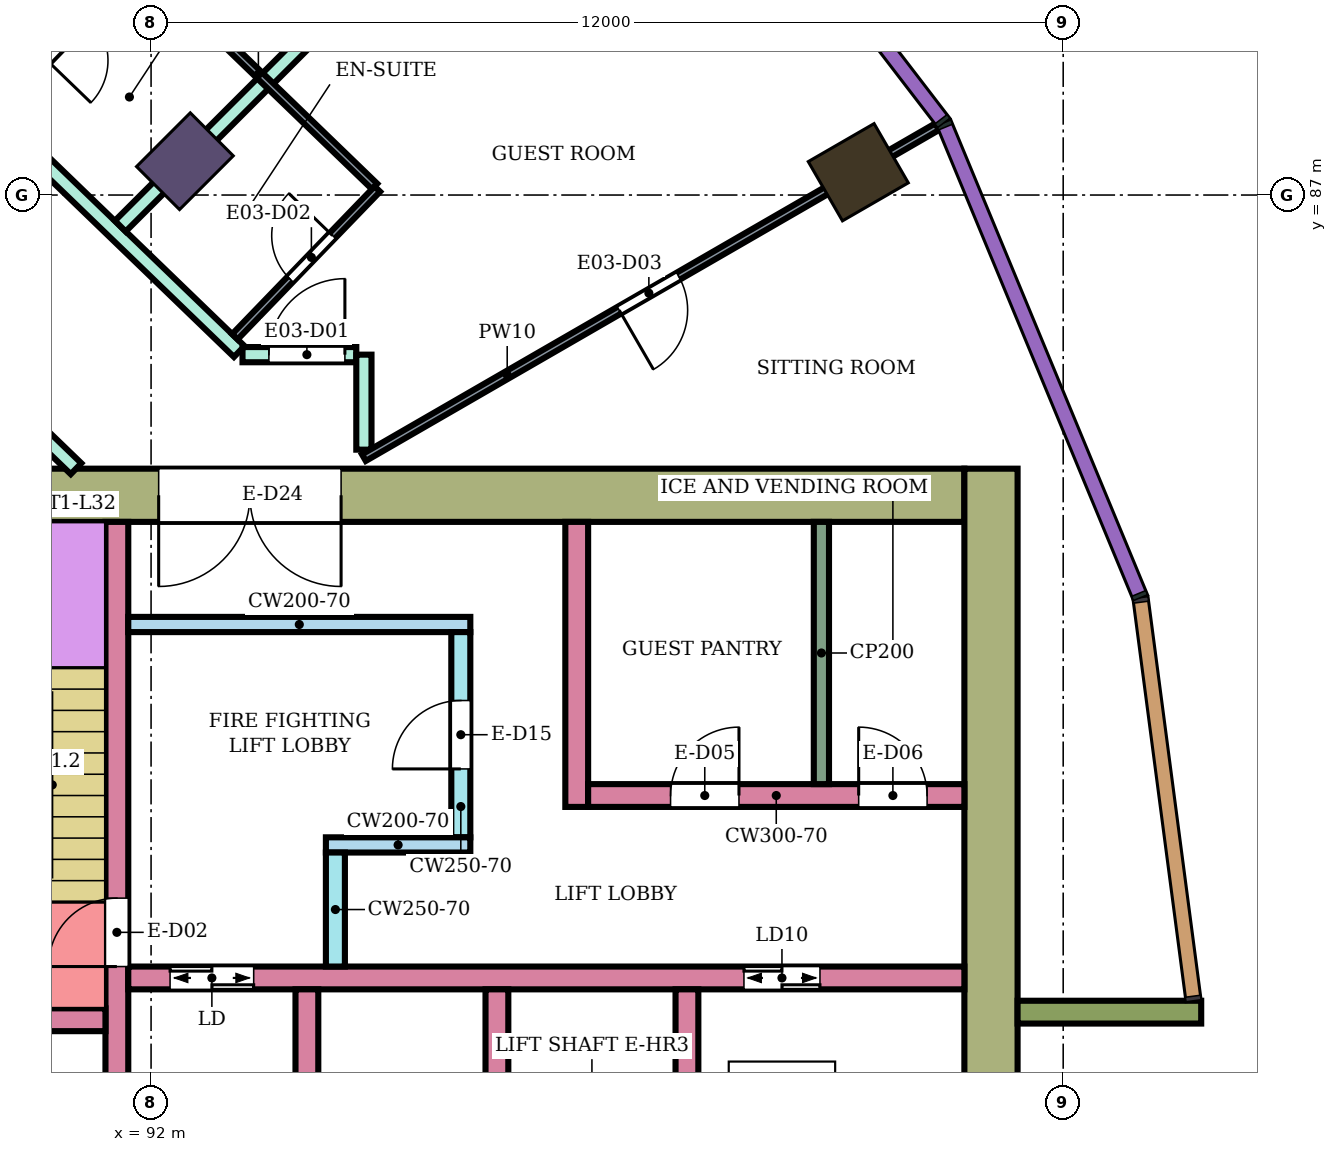
"""IFC4 building model, lengths in metres.
Left out: names, types, materials, properties, quantities, classifications, styles, units other than length and angle.
Written with IfcOpenShell. Run it as: python <this file> out.ifc"""

import sys

from ifc_helpers import new_model, si_unit, direction, frame, frame_2d, origin, origin_2d, place, context, subcontext, project, spatial, rectangle, extrude, element, fill, save


model = new_model("IFC4")
c1 = context("Model", 3, precision=1e-05, world=origin(), true_north=direction((0.0, 1.0)))
c2 = subcontext(c1, "Body", "Model", "MODEL_VIEW")
j1 = project(units=[si_unit("LENGTHUNIT", "METRE"), si_unit("PLANEANGLEUNIT", "RADIAN")], contexts=[c1])
p1 = place(None, origin())
s1 = spatial("IfcSite", under=j1, at=p1, CompositionType="ELEMENT")
p2 = place(p1, origin())
s2 = spatial("IfcBuilding", under=s1, at=p2, CompositionType="ELEMENT")
p3 = place(p2, frame((0.0, 0.0, 138.0)))
s3 = spatial("IfcBuildingStorey", under=s2, at=p3, CompositionType="ELEMENT", Elevation=138.0)
p4 = place(p3, frame((101.304, 87.3, 0.0), z_axis=(0.0, 0.0, 1.0), x_axis=(0.866025403784, 0.5, 0.0)))
e1 = element("IfcColumn", 1, at=p4, inside=s3, PredefinedType="COLUMN", context=c2, shape_type="SweptSolid", body=[
    extrude(rectangle(XDim=1.0, YDim=0.9, at=origin_2d()), origin(), (0.0, 0.0, 1.0), 3.9),
])
p5 = place(p3, frame((92.445, 87.445, 0.0), z_axis=(0.0, 0.0, 1.0), x_axis=(0.707106781187, 0.707106781187, 0.0)))
e2 = element("IfcColumn", 2, at=p5, inside=s3, PredefinedType="COLUMN", context=c2, shape_type="SweptSolid", body=[
    extrude(rectangle(XDim=1.0, YDim=0.8, at=origin_2d()), origin(), (0.0, 0.0, 1.0), 3.9),
])
p6 = place(p3, frame((87.9, 83.05, 0.0), z_axis=(0.0, 0.0, 1.0), x_axis=(1.0, 0.0, 0.0)))
e3 = element("IfcWall", 3, at=p6, inside=s3, PredefinedType="SHEAR", context=c2, shape_type="SweptSolid", body=[
    extrude(rectangle(XDim=14.8, YDim=0.7, at=frame_2d((7.4, 0.0))), origin(), (0.0, 0.0, 1.0), 3.58),
])
p7 = place(p6, frame((4.2, 0.0, 0.0)))
e4 = element("IfcOpeningElement", 4, at=p7, cuts=e3, PredefinedType="OPENING", context=c2, shape_type="SweptSolid", body=[
    extrude(rectangle(XDim=2.4, YDim=2.4, at=frame_2d((1.2, 1.2))), frame((0.0, 0.36, 0.0), z_axis=(0.0, -1.0, 0.0), x_axis=(1.0, 0.0, 0.0)), (0.0, 0.0, 1.0), 0.72),
])
p8 = place(p3, frame((103.05, 66.6, 0.0), z_axis=(0.0, 0.0, 1.0), x_axis=(0.0, 1.0, 0.0)))
e5 = element("IfcWall", 5, at=p8, inside=s3, PredefinedType="SHEAR", context=c2, shape_type="SweptSolid", body=[
    extrude(rectangle(XDim=16.8, YDim=0.7, at=frame_2d((8.4, 0.0))), origin(), (0.0, 0.0, 1.0), 3.58),
])
p9 = place(p3, frame((91.55, 75.0, 0.0), z_axis=(0.0, 0.0, 1.0), x_axis=(0.0, 1.0, 0.0)))
e6 = element("IfcWall", 6, at=p9, inside=s3, PredefinedType="SHEAR", context=c2, shape_type="SweptSolid", body=[
    extrude(rectangle(XDim=7.7, YDim=0.3, at=frame_2d((3.85, 0.0))), origin(), (0.0, 0.0, 1.0), 3.58),
])
p10 = place(p9, frame((1.85, 0.0, 0.0)))
e7 = element("IfcOpeningElement", 7, at=p10, cuts=e6, PredefinedType="OPENING", context=c2, shape_type="SweptSolid", body=[
    extrude(rectangle(XDim=0.9, YDim=2.1, at=frame_2d((0.45, 1.05))), frame((0.0, 0.16, 0.0), z_axis=(0.0, -1.0, 0.0), x_axis=(1.0, 0.0, 0.0)), (0.0, 0.0, 1.0), 0.32),
])
p11 = place(p3, frame((88.35, 76.15, 0.0), z_axis=(0.0, 0.0, 1.0), x_axis=(1.0, 0.0, 0.0)))
e8 = element("IfcWall", 8, at=p11, inside=s3, PredefinedType="SHEAR", context=c2, shape_type="SweptSolid", body=[
    extrude(rectangle(XDim=3.05, YDim=0.3, at=frame_2d((1.525, 0.0))), origin(), (0.0, 0.0, 1.0), 3.58),
])
p12 = place(p11, frame((1.1, 0.0, 0.0)))
e9 = element("IfcOpeningElement", 9, at=p12, cuts=e8, PredefinedType="OPENING", context=c2, shape_type="SweptSolid", body=[
    extrude(rectangle(XDim=0.7, YDim=2.0, at=frame_2d((0.35, 1.0))), frame((0.0, 0.16, 0.0), z_axis=(0.0, -1.0, 0.0), x_axis=(1.0, 0.0, 0.0)), (0.0, 0.0, 1.0), 0.32),
])
p13 = place(p3, frame((91.7, 76.7, 0.0), z_axis=(0.0, 0.0, 1.0), x_axis=(1.0, 0.0, 0.0)))
e10 = element("IfcWall", 10, at=p13, inside=s3, PredefinedType="SHEAR", context=c2, shape_type="SweptSolid", body=[
    extrude(rectangle(XDim=11.0, YDim=0.3, at=frame_2d((5.5, 0.0))), origin(), (0.0, 0.0, 1.0), 3.58),
])
p14 = place(p13, frame((0.55, 0.0, 0.0)))
e11 = element("IfcOpeningElement", 11, at=p14, cuts=e10, PredefinedType="OPENING", context=c2, shape_type="SweptSolid", body=[
    extrude(rectangle(XDim=1.1, YDim=2.1, at=frame_2d((0.55, 1.05))), frame((0.0, 0.16, 0.0), z_axis=(0.0, -1.0, 0.0), x_axis=(1.0, 0.0, 0.0)), (0.0, 0.0, 1.0), 0.32),
])
p15 = place(p13, frame((8.1, 0.0, 0.0)))
e12 = element("IfcOpeningElement", 12, at=p15, cuts=e10, PredefinedType="OPENING", context=c2, shape_type="SweptSolid", body=[
    extrude(rectangle(XDim=1.0, YDim=2.1, at=frame_2d((0.5, 1.05))), frame((0.0, 0.16, 0.0), z_axis=(0.0, -1.0, 0.0), x_axis=(1.0, 0.0, 0.0)), (0.0, 0.0, 1.0), 0.32),
])
for number, where, z_axis, x_axis in (
    (13, (94.05, 74.0, 0.0), (0.0, 0.0, 1.0), (0.0, 1.0, 0.0)),
    (14, (96.55, 74.0, 0.0), (0.0, 0.0, 1.0), (0.0, 1.0, 0.0)),
    (15, (99.05, 74.0, 0.0), (0.0, 0.0, 1.0), (0.0, 1.0, 0.0)),
):
    element("IfcWall", number, at=place(p3, frame(where, z_axis=z_axis, x_axis=x_axis)), inside=s3, PredefinedType="SHEAR", context=c2, shape_type="SweptSolid", body=[
        extrude(rectangle(XDim=2.55, YDim=0.3, at=frame_2d((1.275, 0.0))), origin(), (0.0, 0.0, 1.0), 3.58),
    ])
p16 = place(p3, frame((91.7, 81.35, 0.0), z_axis=(0.0, 0.0, 1.0), x_axis=(1.0, 0.0, 0.0)))
e16 = element("IfcWall", 16, at=p16, inside=s3, PredefinedType="SHEAR", context=c2, shape_type="SweptSolid", body=[
    extrude(rectangle(XDim=4.5, YDim=0.2, at=frame_2d((2.25, 0.0))), origin(), (0.0, 0.0, 1.0), 3.58),
])
p17 = place(p3, frame((96.075, 78.55, 0.0), z_axis=(0.0, 0.0, 1.0), x_axis=(0.0, 1.0, 0.0)))
e17 = element("IfcWall", 17, at=p17, inside=s3, PredefinedType="SHEAR", context=c2, shape_type="SweptSolid", body=[
    extrude(rectangle(XDim=2.7, YDim=0.25, at=frame_2d((1.35, 0.0))), origin(), (0.0, 0.0, 1.0), 3.58),
])
p18 = place(p17, frame((0.9, 0.0, 0.0)))
e18 = element("IfcOpeningElement", 18, at=p18, cuts=e17, PredefinedType="OPENING", context=c2, shape_type="SweptSolid", body=[
    extrude(rectangle(XDim=0.9, YDim=2.1, at=frame_2d((0.45, 1.05))), frame((0.0, 0.135, 0.0), z_axis=(0.0, -1.0, 0.0), x_axis=(1.0, 0.0, 0.0)), (0.0, 0.0, 1.0), 0.27),
])
p19 = place(p3, frame((94.3, 78.45, 0.0), z_axis=(0.0, 0.0, 1.0), x_axis=(1.0, 0.0, 0.0)))
e19 = element("IfcWall", 19, at=p19, inside=s3, PredefinedType="SHEAR", context=c2, shape_type="SweptSolid", body=[
    extrude(rectangle(XDim=1.9, YDim=0.2, at=frame_2d((0.95, 0.0))), origin(), (0.0, 0.0, 1.0), 3.58),
])
p20 = place(p3, frame((94.425, 76.85, 0.0), z_axis=(0.0, 0.0, 1.0), x_axis=(0.0, 1.0, 0.0)))
e20 = element("IfcWall", 20, at=p20, inside=s3, PredefinedType="SHEAR", context=c2, shape_type="SweptSolid", body=[
    extrude(rectangle(XDim=1.5, YDim=0.25, at=frame_2d((0.75, 0.0))), origin(), (0.0, 0.0, 1.0), 3.58),
])
p21 = place(p3, frame((97.6, 78.95, 0.0), z_axis=(0.0, 0.0, 1.0), x_axis=(0.0, 1.0, 0.0)))
e21 = element("IfcWall", 21, at=p21, inside=s3, PredefinedType="SHEAR", context=c2, shape_type="SweptSolid", body=[
    extrude(rectangle(XDim=3.75, YDim=0.3, at=frame_2d((1.875, 0.0))), origin(), (0.0, 0.0, 1.0), 3.58),
])
p22 = place(p3, frame((97.75, 79.1, 0.0), z_axis=(0.0, 0.0, 1.0), x_axis=(1.0, 0.0, 0.0)))
e22 = element("IfcWall", 22, at=p22, inside=s3, PredefinedType="SHEAR", context=c2, shape_type="SweptSolid", body=[
    extrude(rectangle(XDim=4.95, YDim=0.3, at=frame_2d((2.475, 0.0))), origin(), (0.0, 0.0, 1.0), 3.58),
])
p23 = place(p22, frame((1.084, 0.0, 0.0)))
e23 = element("IfcOpeningElement", 23, at=p23, cuts=e22, PredefinedType="OPENING", context=c2, shape_type="SweptSolid", body=[
    extrude(rectangle(XDim=0.9, YDim=2.1, at=frame_2d((0.45, 1.05))), frame((0.0, 0.16, 0.0), z_axis=(0.0, -1.0, 0.0), x_axis=(1.0, 0.0, 0.0)), (0.0, 0.0, 1.0), 0.32),
])
p24 = place(p22, frame((3.56, 0.0, 0.0)))
e24 = element("IfcOpeningElement", 24, at=p24, cuts=e22, PredefinedType="OPENING", context=c2, shape_type="SweptSolid", body=[
    extrude(rectangle(XDim=0.9, YDim=2.1, at=frame_2d((0.45, 1.05))), frame((0.0, 0.16, 0.0), z_axis=(0.0, -1.0, 0.0), x_axis=(1.0, 0.0, 0.0)), (0.0, 0.0, 1.0), 0.32),
])
p25 = place(p3, frame((103.4, 76.25, 0.0), z_axis=(0.0, 0.0, 1.0), x_axis=(1.0, 0.0, 0.0)))
e25 = element("IfcWall", 25, at=p25, inside=s3, PredefinedType="NOTDEFINED", context=c2, shape_type="SweptSolid", body=[
    extrude(rectangle(XDim=2.416, YDim=0.3, at=frame_2d((1.208, 0.0))), origin(), (0.0, 0.0, 1.0), 3.9),
])
p26 = place(p3, frame((87.064, 87.211, 0.0), z_axis=(0.0, 0.0, 1.0), x_axis=(0.719562412484, -0.694427774891, 0.0)))
e26 = element("IfcWall", 26, at=p26, inside=s3, PredefinedType="PARTITIONING", context=c2, shape_type="SweptSolid", body=[
    extrude(rectangle(XDim=5.488, YDim=0.2, at=frame_2d((2.744, 0.0))), origin(), (0.0, 0.0, 1.0), 3.45),
])
p27 = place(p26, frame((2.294, 0.0, 0.0)))
e27 = element("IfcOpeningElement", 27, at=p27, cuts=e26, PredefinedType="OPENING", context=c2, shape_type="SweptSolid", body=[
    extrude(rectangle(XDim=0.9, YDim=2.1, at=frame_2d((0.45, 1.05))), frame((0.0, 0.11, 0.0), z_axis=(0.0, -1.0, 0.0), x_axis=(1.0, 0.0, 0.0)), (0.0, 0.0, 1.0), 0.22),
])
p28 = place(p3, frame((88.386, 89.549, 0.0), z_axis=(0.0, 0.0, 1.0), x_axis=(0.719507339337, -0.694484836869, 0.0)))
e28 = element("IfcWall", 28, at=p28, inside=s3, PredefinedType="PARTITIONING", context=c2, shape_type="SweptSolid", body=[
    extrude(rectangle(XDim=6.635, YDim=0.2, at=frame_2d((3.317, 0.0))), origin(), (0.0, 0.0, 1.0), 3.45),
])
p29 = place(p3, frame((91.595, 86.591, 0.0), z_axis=(0.0, 0.0, 1.0), x_axis=(0.707214399597, 0.706999146394, 0.0)))
e29 = element("IfcWall", 29, at=p29, inside=s3, PredefinedType="PARTITIONING", context=c2, shape_type="SweptSolid", body=[
    extrude(rectangle(XDim=6.805, YDim=0.2, at=frame_2d((3.403, 0.0))), origin(), (0.0, 0.0, 1.0), 3.45),
])
p30 = place(p3, frame((93.203, 84.9, 0.0), z_axis=(0.0, 0.0, 1.0), x_axis=(1.0, 0.0, 0.0)))
e30 = element("IfcWall", 30, at=p30, inside=s3, PredefinedType="PARTITIONING", context=c2, shape_type="SweptSolid", body=[
    extrude(rectangle(XDim=1.497, YDim=0.2, at=frame_2d((0.749, 0.0))), origin(), (0.0, 0.0, 1.0), 3.45),
])
p31 = place(p30, frame((0.347, 0.0, 0.0)))
e31 = element("IfcOpeningElement", 31, at=p31, cuts=e30, PredefinedType="OPENING", context=c2, shape_type="SweptSolid", body=[
    extrude(rectangle(XDim=1.0, YDim=2.1, at=frame_2d((0.5, 1.05))), frame((0.0, 0.11, 0.0), z_axis=(0.0, -1.0, 0.0), x_axis=(1.0, 0.0, 0.0)), (0.0, 0.0, 1.0), 0.22),
])
p32 = place(p3, frame((94.8, 83.65, 0.0), z_axis=(0.0, 0.0, 1.0), x_axis=(0.0, 1.0, 0.0)))
e32 = element("IfcWall", 32, at=p32, inside=s3, PredefinedType="PARTITIONING", context=c2, shape_type="SweptSolid", body=[
    extrude(rectangle(XDim=1.25, YDim=0.2, at=frame_2d((0.625, 0.0))), origin(), (0.0, 0.0, 1.0), 3.45),
])
p33 = place(p3, frame((90.008, 88.123, 0.0), z_axis=(0.0, 0.0, 1.0), x_axis=(0.694372521817, 0.719615731447, 0.0)))
e33 = element("IfcWall", 33, at=p33, inside=s3, PredefinedType="PARTITIONING", context=c2, shape_type="SweptSolid", body=[
    extrude(rectangle(XDim=2.65, YDim=0.1, at=frame_2d((1.325, 0.0))), origin(), (0.0, 0.0, 1.0), 3.45),
])
p34 = place(p33, frame((0.9, 0.0, 0.0)))
e34 = element("IfcOpeningElement", 34, at=p34, cuts=e33, PredefinedType="OPENING", context=c2, shape_type="SweptSolid", body=[
    extrude(rectangle(XDim=0.8, YDim=2.1, at=frame_2d((0.4, 1.05))), frame((0.0, 0.06, 0.0), z_axis=(0.0, -1.0, 0.0), x_axis=(1.0, 0.0, 0.0)), (0.0, 0.0, 1.0), 0.12),
])
p35 = place(p3, frame((91.883, 90.066, 0.0), z_axis=(0.0, 0.0, 1.0), x_axis=(0.719460839421, -0.694533008963, 0.0)))
e35 = element("IfcWall", 35, at=p35, inside=s3, PredefinedType="PARTITIONING", context=c2, shape_type="SweptSolid", body=[
    extrude(rectangle(XDim=4.25, YDim=0.1, at=frame_2d((2.125, 0.0))), origin(), (0.0, 0.0, 1.0), 3.45),
])
p36 = place(p3, frame((93.103, 85.136, 0.0), z_axis=(0.0, 0.0, 1.0), x_axis=(0.694287838235, 0.719697434815, 0.0)))
e36 = element("IfcWall", 36, at=p36, inside=s3, PredefinedType="PARTITIONING", context=c2, shape_type="SweptSolid", body=[
    extrude(rectangle(XDim=2.7, YDim=0.1, at=frame_2d((1.35, 0.0))), origin(), (0.0, 0.0, 1.0), 3.45),
])
p37 = place(p36, frame((1.05, 0.0, 0.0)))
e37 = element("IfcOpeningElement", 37, at=p37, cuts=e36, PredefinedType="OPENING", context=c2, shape_type="SweptSolid", body=[
    extrude(rectangle(XDim=0.8, YDim=2.1, at=frame_2d((0.4, 1.05))), frame((0.0, 0.06, 0.0), z_axis=(0.0, -1.0, 0.0), x_axis=(1.0, 0.0, 0.0)), (0.0, 0.0, 1.0), 0.12),
])
p38 = place(p3, frame((94.8, 83.545, 0.0), z_axis=(0.0, 0.0, 1.0), x_axis=(0.86602264145, 0.500004784474, 0.0)))
e38 = element("IfcWall", 38, at=p38, inside=s3, PredefinedType="PARTITIONING", context=c2, shape_type="SweptSolid", body=[
    extrude(rectangle(XDim=8.708, YDim=0.1, at=frame_2d((4.354, 0.0))), origin(), (0.0, 0.0, 1.0), 3.45),
])
p39 = place(p38, frame((3.879, 0.0, 0.0)))
e39 = element("IfcOpeningElement", 39, at=p39, cuts=e38, PredefinedType="OPENING", context=c2, shape_type="SweptSolid", body=[
    extrude(rectangle(XDim=0.9, YDim=2.1, at=frame_2d((0.45, 1.05))), frame((0.0, 0.06, 0.0), z_axis=(0.0, -1.0, 0.0), x_axis=(1.0, 0.0, 0.0)), (0.0, 0.0, 1.0), 0.12),
])
p40 = place(p3, frame((100.819, 79.25, 0.0), z_axis=(0.0, 0.0, 1.0), x_axis=(0.0, 1.0, 0.0)))
e40 = element("IfcWall", 40, at=p40, inside=s3, PredefinedType="PARTITIONING", context=c2, shape_type="SweptSolid", body=[
    extrude(rectangle(XDim=3.45, YDim=0.2, at=frame_2d((1.725, 0.0))), origin(), (0.0, 0.0, 1.0), 3.58),
])
p41 = place(p31, origin())
e41 = element("IfcDoor", 41, at=p41, inside=s3, OperationType="SINGLE_SWING_RIGHT", PredefinedType="DOOR", context=c2, shape_type="SweptSolid", body=[
    extrude(rectangle(XDim=1.0, YDim=2.1, at=frame_2d((0.5, 1.05))), frame((0.0, 0.025, 0.0), z_axis=(0.0, -1.0, 0.0), x_axis=(1.0, 0.0, 0.0)), (0.0, 0.0, 1.0), 0.05),
])
fill(e31, e41)
p42 = place(p37, origin())
e42 = element("IfcDoor", 42, at=p42, inside=s3, OperationType="SINGLE_SWING_RIGHT", PredefinedType="DOOR", context=c2, shape_type="SweptSolid", body=[
    extrude(rectangle(XDim=0.8, YDim=2.1, at=frame_2d((0.4, 1.05))), frame((0.0, 0.025, 0.0), z_axis=(0.0, -1.0, 0.0), x_axis=(1.0, 0.0, 0.0)), (0.0, 0.0, 1.0), 0.05),
])
fill(e37, e42)
p43 = place(p39, frame((0.9, 0.0, 0.0), z_axis=(0.0, 0.0, 1.0), x_axis=(-1.0, 0.0, 0.0)))
e43 = element("IfcDoor", 43, at=p43, inside=s3, OperationType="SINGLE_SWING_RIGHT", PredefinedType="DOOR", context=c2, shape_type="SweptSolid", body=[
    extrude(rectangle(XDim=0.9, YDim=2.1, at=frame_2d((0.45, 1.05))), frame((0.0, 0.025, 0.0), z_axis=(0.0, -1.0, 0.0), x_axis=(1.0, 0.0, 0.0)), (0.0, 0.0, 1.0), 0.05),
])
fill(e39, e43)
p44 = place(p34, frame((0.8, 0.0, 0.0), z_axis=(0.0, 0.0, 1.0), x_axis=(-1.0, 0.0, 0.0)))
e44 = element("IfcDoor", 44, at=p44, inside=s3, OperationType="SINGLE_SWING_RIGHT", PredefinedType="DOOR", context=c2, shape_type="SweptSolid", body=[
    extrude(rectangle(XDim=0.8, YDim=2.1, at=frame_2d((0.4, 1.05))), frame((0.0, 0.025, 0.0), z_axis=(0.0, -1.0, 0.0), x_axis=(1.0, 0.0, 0.0)), (0.0, 0.0, 1.0), 0.05),
])
fill(e34, e44)
p45 = place(p10, origin())
e45 = element("IfcDoor", 45, at=p45, inside=s3, OperationType="SINGLE_SWING_LEFT", PredefinedType="DOOR", context=c2, shape_type="SweptSolid", body=[
    extrude(rectangle(XDim=0.9, YDim=2.1, at=frame_2d((0.45, 1.05))), frame((0.0, 0.025, 0.0), z_axis=(0.0, -1.0, 0.0), x_axis=(1.0, 0.0, 0.0)), (0.0, 0.0, 1.0), 0.05),
])
fill(e7, e45)
p46 = place(p14, origin())
e46 = element("IfcDoor", 46, at=p46, inside=s3, OperationType="DOUBLE_DOOR_SLIDING", PredefinedType="DOOR", context=c2, shape_type="SweptSolid", body=[
    extrude(rectangle(XDim=1.1, YDim=2.1, at=frame_2d((0.55, 1.05))), frame((0.0, 0.025, 0.0), z_axis=(0.0, -1.0, 0.0), x_axis=(1.0, 0.0, 0.0)), (0.0, 0.0, 1.0), 0.05),
])
fill(e11, e46)
p47 = place(p15, origin())
e47 = element("IfcDoor", 47, at=p47, inside=s3, OperationType="DOUBLE_DOOR_SLIDING", PredefinedType="DOOR", context=c2, shape_type="SweptSolid", body=[
    extrude(rectangle(XDim=1.0, YDim=2.1, at=frame_2d((0.5, 1.05))), frame((0.0, 0.025, 0.0), z_axis=(0.0, -1.0, 0.0), x_axis=(1.0, 0.0, 0.0)), (0.0, 0.0, 1.0), 0.05),
])
fill(e12, e47)
p48 = place(p18, origin())
e48 = element("IfcDoor", 48, at=p48, inside=s3, OperationType="SINGLE_SWING_LEFT", PredefinedType="DOOR", context=c2, shape_type="SweptSolid", body=[
    extrude(rectangle(XDim=0.9, YDim=2.1, at=frame_2d((0.45, 1.05))), frame((0.0, 0.025, 0.0), z_axis=(0.0, -1.0, 0.0), x_axis=(1.0, 0.0, 0.0)), (0.0, 0.0, 1.0), 0.05),
])
fill(e18, e48)
p49 = place(p23, origin())
e49 = element("IfcDoor", 49, at=p49, inside=s3, OperationType="SINGLE_SWING_RIGHT", PredefinedType="DOOR", context=c2, shape_type="SweptSolid", body=[
    extrude(rectangle(XDim=0.9, YDim=2.1, at=frame_2d((0.45, 1.05))), frame((0.0, 0.025, 0.0), z_axis=(0.0, -1.0, 0.0), x_axis=(1.0, 0.0, 0.0)), (0.0, 0.0, 1.0), 0.05),
])
fill(e23, e49)
p50 = place(p24, origin())
e50 = element("IfcDoor", 50, at=p50, inside=s3, OperationType="SINGLE_SWING_LEFT", PredefinedType="DOOR", context=c2, shape_type="SweptSolid", body=[
    extrude(rectangle(XDim=0.9, YDim=2.1, at=frame_2d((0.45, 1.05))), frame((0.0, 0.025, 0.0), z_axis=(0.0, -1.0, 0.0), x_axis=(1.0, 0.0, 0.0)), (0.0, 0.0, 1.0), 0.05),
])
fill(e24, e50)
p51 = place(p7, frame((2.4, 0.0, 0.0), z_axis=(0.0, 0.0, 1.0), x_axis=(-1.0, 0.0, 0.0)))
e51 = element("IfcDoor", 51, at=p51, inside=s3, OperationType="DOUBLE_DOOR_SINGLE_SWING", PredefinedType="DOOR", context=c2, shape_type="SweptSolid", body=[
    extrude(rectangle(XDim=2.4, YDim=2.4, at=frame_2d((1.2, 1.2))), frame((0.0, 0.025, 0.0), z_axis=(0.0, -1.0, 0.0), x_axis=(1.0, 0.0, 0.0)), (0.0, 0.0, 1.0), 0.05),
])
fill(e4, e51)
save(model, sys.argv[1])
